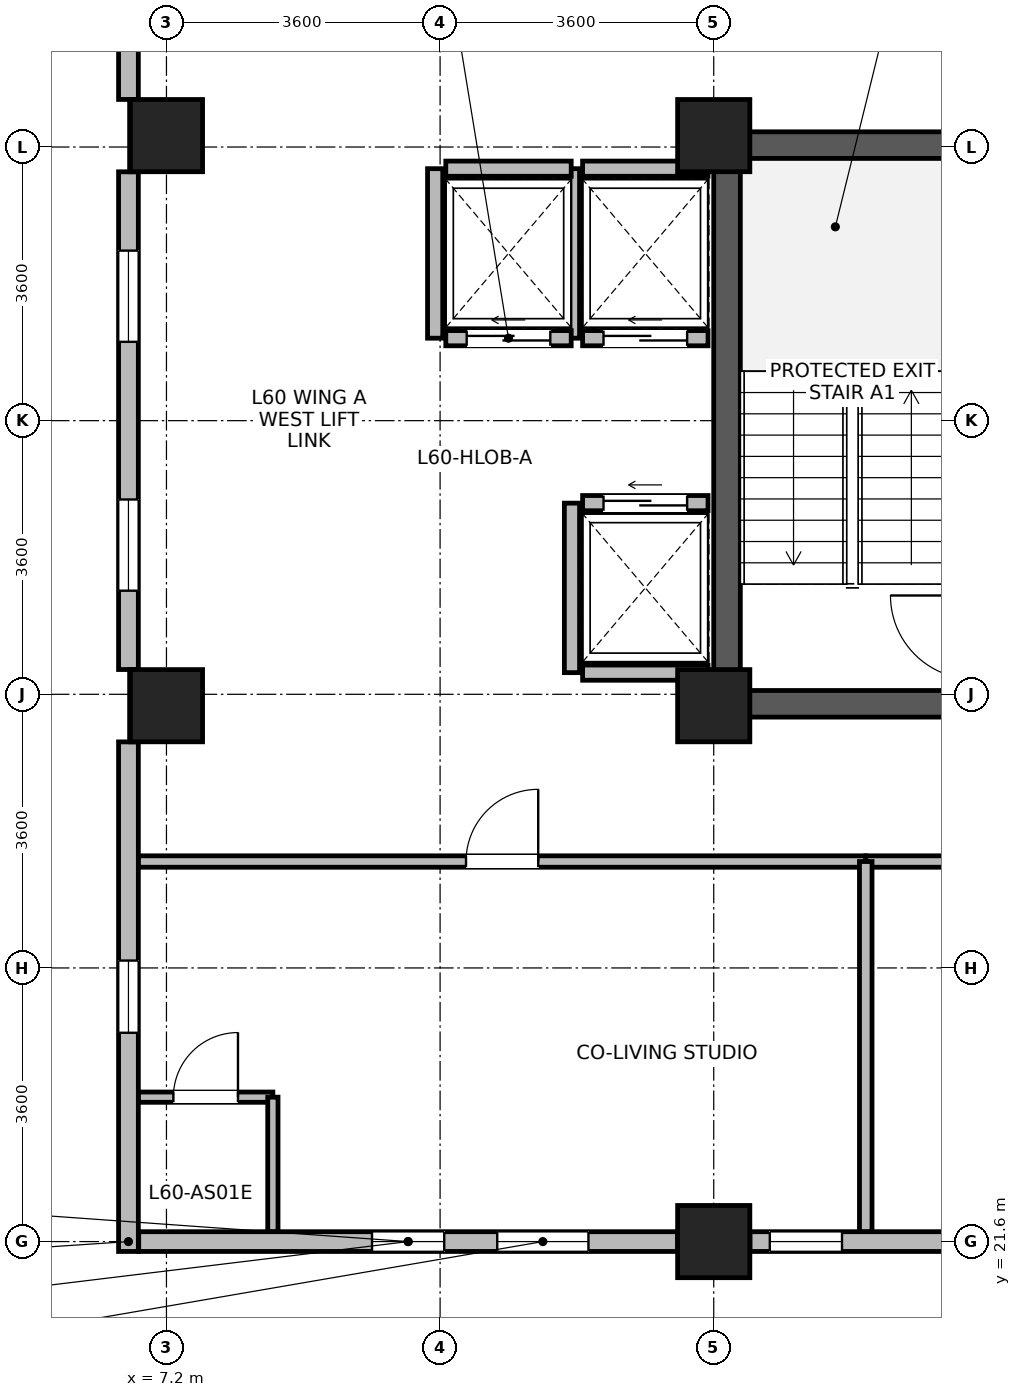
"""IFC4 building model, lengths in metres.
Left out: names, types, materials, properties, quantities, classifications, styles, units other than length and angle.
Written with IfcOpenShell. Run it as: python <this file> out.ifc"""

import sys

from ifc_helpers import new_model, si_unit, direction, frame, frame_2d, origin, origin_2d, place, context, subcontext, project, spatial, rectangle, extrude, source, transform, mapped, element, fill, save


model = new_model("IFC4")
c1 = context("Model", 3, precision=1e-05, world=origin(), true_north=direction((0.0, 1.0)))
c2 = subcontext(c1, "Body", "Model", "MODEL_VIEW")
j1 = project(units=[si_unit("LENGTHUNIT", "METRE"), si_unit("PLANEANGLEUNIT", "RADIAN")], contexts=[c1])
p1 = place(None, origin())
s1 = spatial("IfcSite", under=j1, at=p1, CompositionType="ELEMENT")
p2 = place(p1, origin())
s2 = spatial("IfcBuilding", under=s1, at=p2, CompositionType="ELEMENT")
p3 = place(p2, frame((0.0, 0.0, 235.1)))
s3 = spatial("IfcBuildingStorey", under=s2, at=p3, CompositionType="ELEMENT", Elevation=235.1)
p4 = place(p3, frame((14.575, 28.5, 0.0), z_axis=(0.0, 0.0, 1.0), x_axis=(0.0, 1.0, 0.0)))
e1 = element("IfcWall", 1, at=p4, inside=s3, PredefinedType="SHEAR", context=c2, shape_type="SweptSolid", body=[
    extrude(rectangle(XDim=7.7, YDim=0.35, at=frame_2d((3.85, 0.0))), origin(), (0.0, 0.0, 1.0), 3.44),
])
for number, where, z_axis, x_axis in (
    (2, (14.75, 28.675, 0.0), (0.0, 0.0, 1.0), (1.0, 0.0, 0.0)),
    (3, (14.75, 36.025, 0.0), (0.0, 0.0, 1.0), (1.0, 0.0, 0.0)),
):
    element("IfcWall", number, at=place(p3, frame(where, z_axis=z_axis, x_axis=x_axis)), inside=s3, PredefinedType="SHEAR", context=c2, shape_type="SweptSolid", body=[
        extrude(rectangle(XDim=3.2, YDim=0.35, at=frame_2d((1.6, 0.0))), origin(), (0.0, 0.0, 1.0), 3.44),
    ])
m1 = source(origin(), c2, "Body", "SweptSolid", [
    extrude(rectangle(XDim=0.95, YDim=0.95, at=origin_2d()), origin(), (0.0, 0.0, 1.0), 3.7),
])
for number, where, z_axis, x_axis in (
    (4, (7.2, 28.65, 0.0), (0.0, 0.0, 1.0), (1.0, 0.0, 0.0)),
    (5, (7.2, 36.15, 0.0), (0.0, 0.0, 1.0), (1.0, 0.0, 0.0)),
    (6, (14.4, 21.6, 0.0), (0.0, 0.0, 1.0), (1.0, 0.0, 0.0)),
    (7, (14.4, 28.65, 0.0), (0.0, 0.0, 1.0), (1.0, 0.0, 0.0)),
    (8, (14.4, 36.15, 0.0), (0.0, 0.0, 1.0), (1.0, 0.0, 0.0)),
):
    element("IfcColumn", number, at=place(p3, frame(where, z_axis=z_axis, x_axis=x_axis)), inside=s3, PredefinedType="COLUMN", context=c2, shape_type="MappedRepresentation", body=[
        mapped(m1, transform((0.0, 0.0, 0.0), x_axis=(1.0, 0.0, 0.0), y_axis=(0.0, 1.0, 0.0), z_axis=(0.0, 0.0, 1.0), scale=1.0)),
    ])
p5 = place(p3, frame((13.924, 21.6, 0.0), z_axis=(0.0, 0.0, 1.0), x_axis=(-1.0, 0.0, 0.0)))
e9 = element("IfcWall", 9, at=p5, inside=s3, PredefinedType="STANDARD", context=c2, shape_type="SweptSolid", body=[
    extrude(rectangle(XDim=7.089, YDim=0.26, at=frame_2d((3.544, 0.0))), origin(), (0.0, 0.0, 1.0), 3.42),
])
p6 = place(p5, frame((1.172, 0.0, 0.85)))
e10 = element("IfcOpeningElement", 10, at=p6, cuts=e9, PredefinedType="OPENING", context=c2, shape_type="SweptSolid", body=[
    extrude(rectangle(XDim=1.2, YDim=1.75, at=frame_2d((0.6, 0.875))), frame((0.0, 0.14, 0.0), z_axis=(0.0, -1.0, 0.0), x_axis=(1.0, 0.0, 0.0)), (0.0, 0.0, 1.0), 0.28),
])
p7 = place(p5, frame((3.07, 0.0, 0.85)))
e11 = element("IfcOpeningElement", 11, at=p7, cuts=e9, PredefinedType="OPENING", context=c2, shape_type="SweptSolid", body=[
    extrude(rectangle(XDim=0.95, YDim=1.75, at=frame_2d((0.475, 0.875))), frame((0.0, 0.14, 0.0), z_axis=(0.0, -1.0, 0.0), x_axis=(1.0, 0.0, 0.0)), (0.0, 0.0, 1.0), 0.28),
])
p8 = place(p3, frame((17.8, 21.6, 0.0), z_axis=(0.0, 0.0, 1.0), x_axis=(-1.0, 0.0, 0.0)))
e12 = element("IfcWall", 12, at=p8, inside=s3, PredefinedType="STANDARD", context=c2, shape_type="SweptSolid", body=[
    extrude(rectangle(XDim=2.924, YDim=0.26, at=frame_2d((1.462, 0.0))), origin(), (0.0, 0.0, 1.0), 3.02),
])
p9 = place(p8, frame((1.712, 0.0, 0.85)))
e13 = element("IfcOpeningElement", 13, at=p9, cuts=e12, PredefinedType="OPENING", context=c2, shape_type="SweptSolid", body=[
    extrude(rectangle(XDim=0.95, YDim=1.75, at=frame_2d((0.475, 0.875))), frame((0.0, 0.14, 0.0), z_axis=(0.0, -1.0, 0.0), x_axis=(1.0, 0.0, 0.0)), (0.0, 0.0, 1.0), 0.28),
])
p10 = place(p3, frame((6.7, 36.626, 0.0), z_axis=(0.0, 0.0, 1.0), x_axis=(0.0, 1.0, 0.0)))
e14 = element("IfcWall", 14, at=p10, inside=s3, PredefinedType="STANDARD", context=c2, shape_type="SweptSolid", body=[
    extrude(rectangle(XDim=6.704, YDim=0.26, at=frame_2d((3.352, 0.0))), origin(), (0.0, 0.0, 1.0), 3.42),
])
p11 = place(p10, frame((4.428, 0.0, 0.85)))
e15 = element("IfcOpeningElement", 15, at=p11, cuts=e14, PredefinedType="OPENING", context=c2, shape_type="SweptSolid", body=[
    extrude(rectangle(XDim=1.2, YDim=1.75, at=frame_2d((0.6, 0.875))), frame((0.0, 0.14, 0.0), z_axis=(0.0, -1.0, 0.0), x_axis=(1.0, 0.0, 0.0)), (0.0, 0.0, 1.0), 0.28),
])
p12 = place(p10, frame((2.877, 0.0, 0.85)))
e16 = element("IfcOpeningElement", 16, at=p12, cuts=e14, PredefinedType="OPENING", context=c2, shape_type="SweptSolid", body=[
    extrude(rectangle(XDim=0.95, YDim=1.75, at=frame_2d((0.475, 0.875))), frame((0.0, 0.14, 0.0), z_axis=(0.0, -1.0, 0.0), x_axis=(1.0, 0.0, 0.0)), (0.0, 0.0, 1.0), 0.28),
])
p13 = place(p3, frame((6.7, 29.126, 0.0), z_axis=(0.0, 0.0, 1.0), x_axis=(0.0, 1.0, 0.0)))
e17 = element("IfcWall", 17, at=p13, inside=s3, PredefinedType="STANDARD", context=c2, shape_type="SweptSolid", body=[
    extrude(rectangle(XDim=6.548, YDim=0.26, at=frame_2d((3.274, 0.0))), origin(), (0.0, 0.0, 1.0), 3.42),
])
p14 = place(p13, frame((1.037, 0.0, 0.85)))
e18 = element("IfcOpeningElement", 18, at=p14, cuts=e17, PredefinedType="OPENING", context=c2, shape_type="SweptSolid", body=[
    extrude(rectangle(XDim=1.2, YDim=1.75, at=frame_2d((0.6, 0.875))), frame((0.0, 0.14, 0.0), z_axis=(0.0, -1.0, 0.0), x_axis=(1.0, 0.0, 0.0)), (0.0, 0.0, 1.0), 0.28),
])
p15 = place(p13, frame((4.311, 0.0, 0.85)))
e19 = element("IfcOpeningElement", 19, at=p15, cuts=e17, PredefinedType="OPENING", context=c2, shape_type="SweptSolid", body=[
    extrude(rectangle(XDim=1.2, YDim=1.75, at=frame_2d((0.6, 0.875))), frame((0.0, 0.14, 0.0), z_axis=(0.0, -1.0, 0.0), x_axis=(1.0, 0.0, 0.0)), (0.0, 0.0, 1.0), 0.28),
])
p16 = place(p3, frame((6.7, 21.47, 0.0), z_axis=(0.0, 0.0, 1.0), x_axis=(0.0, 1.0, 0.0)))
e20 = element("IfcWall", 20, at=p16, inside=s3, PredefinedType="STANDARD", context=c2, shape_type="SweptSolid", body=[
    extrude(rectangle(XDim=6.704, YDim=0.26, at=frame_2d((3.352, 0.0))), origin(), (0.0, 0.0, 1.0), 3.42),
])
p17 = place(p16, frame((2.877, 0.0, 0.85)))
e21 = element("IfcOpeningElement", 21, at=p17, cuts=e20, PredefinedType="OPENING", context=c2, shape_type="SweptSolid", body=[
    extrude(rectangle(XDim=0.95, YDim=1.75, at=frame_2d((0.475, 0.875))), frame((0.0, 0.14, 0.0), z_axis=(0.0, -1.0, 0.0), x_axis=(1.0, 0.0, 0.0)), (0.0, 0.0, 1.0), 0.28),
])
p18 = place(p3, frame((12.675, 33.485, 0.0), z_axis=(0.0, 0.0, 1.0), x_axis=(1.0, 0.0, 0.0)))
e22 = element("IfcWall", 22, at=p18, inside=s3, PredefinedType="PARTITIONING", context=c2, shape_type="SweptSolid", body=[
    extrude(rectangle(XDim=1.65, YDim=0.2, at=frame_2d((0.825, 0.0))), origin(), (0.0, 0.0, 1.0), 3.42),
])
p19 = place(p18, frame((0.275, 0.0, 0.0)))
e23 = element("IfcOpeningElement", 23, at=p19, cuts=e22, PredefinedType="OPENING", context=c2, shape_type="SweptSolid", body=[
    extrude(rectangle(XDim=1.1, YDim=2.12, at=frame_2d((0.55, 1.06))), frame((0.0, 0.11, 0.0), z_axis=(0.0, -1.0, 0.0), x_axis=(1.0, 0.0, 0.0)), (0.0, 0.0, 1.0), 0.22),
])
p20 = place(p3, frame((12.675, 35.715, 0.0), z_axis=(0.0, 0.0, 1.0), x_axis=(1.0, 0.0, 0.0)))
e24 = element("IfcWall", 24, at=p20, inside=s3, PredefinedType="PARTITIONING", context=c2, shape_type="SweptSolid", body=[
    extrude(rectangle(XDim=1.65, YDim=0.2, at=frame_2d((0.825, 0.0))), origin(), (0.0, 0.0, 1.0), 3.42),
])
p21 = place(p3, frame((12.535, 33.485, 0.0), z_axis=(0.0, 0.0, 1.0), x_axis=(0.0, 1.0, 0.0)))
e25 = element("IfcWall", 25, at=p21, inside=s3, PredefinedType="PARTITIONING", context=c2, shape_type="SweptSolid", body=[
    extrude(rectangle(XDim=2.23, YDim=0.2, at=frame_2d((1.115, 0.0))), origin(), (0.0, 0.0, 1.0), 3.42),
])
p22 = place(p3, frame((12.675, 29.085, 0.0), z_axis=(0.0, 0.0, 1.0), x_axis=(1.0, 0.0, 0.0)))
e26 = element("IfcWall", 26, at=p22, inside=s3, PredefinedType="PARTITIONING", context=c2, shape_type="SweptSolid", body=[
    extrude(rectangle(XDim=1.65, YDim=0.2, at=frame_2d((0.825, 0.0))), origin(), (0.0, 0.0, 1.0), 3.42),
])
p23 = place(p3, frame((12.675, 31.315, 0.0), z_axis=(0.0, 0.0, 1.0), x_axis=(1.0, 0.0, 0.0)))
e27 = element("IfcWall", 27, at=p23, inside=s3, PredefinedType="PARTITIONING", context=c2, shape_type="SweptSolid", body=[
    extrude(rectangle(XDim=1.65, YDim=0.2, at=frame_2d((0.825, 0.0))), origin(), (0.0, 0.0, 1.0), 3.42),
])
p24 = place(p23, frame((0.275, 0.0, 0.0)))
e28 = element("IfcOpeningElement", 28, at=p24, cuts=e27, PredefinedType="OPENING", context=c2, shape_type="SweptSolid", body=[
    extrude(rectangle(XDim=1.1, YDim=2.12, at=frame_2d((0.55, 1.06))), frame((0.0, 0.11, 0.0), z_axis=(0.0, -1.0, 0.0), x_axis=(1.0, 0.0, 0.0)), (0.0, 0.0, 1.0), 0.22),
])
p25 = place(p3, frame((12.535, 29.085, 0.0), z_axis=(0.0, 0.0, 1.0), x_axis=(0.0, 1.0, 0.0)))
e29 = element("IfcWall", 29, at=p25, inside=s3, PredefinedType="PARTITIONING", context=c2, shape_type="SweptSolid", body=[
    extrude(rectangle(XDim=2.23, YDim=0.2, at=frame_2d((1.115, 0.0))), origin(), (0.0, 0.0, 1.0), 3.42),
])
p26 = place(p3, frame((10.875, 33.485, 0.0), z_axis=(0.0, 0.0, 1.0), x_axis=(1.0, 0.0, 0.0)))
e30 = element("IfcWall", 30, at=p26, inside=s3, PredefinedType="PARTITIONING", context=c2, shape_type="SweptSolid", body=[
    extrude(rectangle(XDim=1.65, YDim=0.2, at=frame_2d((0.825, 0.0))), origin(), (0.0, 0.0, 1.0), 3.42),
])
p27 = place(p26, frame((0.275, 0.0, 0.0)))
e31 = element("IfcOpeningElement", 31, at=p27, cuts=e30, PredefinedType="OPENING", context=c2, shape_type="SweptSolid", body=[
    extrude(rectangle(XDim=1.1, YDim=2.12, at=frame_2d((0.55, 1.06))), frame((0.0, 0.11, 0.0), z_axis=(0.0, -1.0, 0.0), x_axis=(1.0, 0.0, 0.0)), (0.0, 0.0, 1.0), 0.22),
])
p28 = place(p3, frame((10.875, 35.715, 0.0), z_axis=(0.0, 0.0, 1.0), x_axis=(1.0, 0.0, 0.0)))
e32 = element("IfcWall", 32, at=p28, inside=s3, PredefinedType="PARTITIONING", context=c2, shape_type="SweptSolid", body=[
    extrude(rectangle(XDim=1.65, YDim=0.2, at=frame_2d((0.825, 0.0))), origin(), (0.0, 0.0, 1.0), 3.42),
])
p29 = place(p3, frame((10.735, 33.485, 0.0), z_axis=(0.0, 0.0, 1.0), x_axis=(0.0, 1.0, 0.0)))
e33 = element("IfcWall", 33, at=p29, inside=s3, PredefinedType="PARTITIONING", context=c2, shape_type="SweptSolid", body=[
    extrude(rectangle(XDim=2.23, YDim=0.2, at=frame_2d((1.115, 0.0))), origin(), (0.0, 0.0, 1.0), 3.42),
])
p30 = place(p3, frame((6.832, 23.5, 0.0), z_axis=(0.0, 0.0, 1.0), x_axis=(1.0, 0.0, 0.0)))
e34 = element("IfcWall", 34, at=p30, inside=s3, PredefinedType="PARTITIONING", context=c2, shape_type="SweptSolid", body=[
    extrude(rectangle(XDim=1.768, YDim=0.135, at=frame_2d((0.884, 0.0))), origin(), (0.0, 0.0, 1.0), 3.42),
])
p31 = place(p30, frame((0.459, 0.0, 0.0)))
e35 = element("IfcOpeningElement", 35, at=p31, cuts=e34, PredefinedType="OPENING", context=c2, shape_type="SweptSolid", body=[
    extrude(rectangle(XDim=0.85, YDim=2.04, at=frame_2d((0.425, 1.02))), frame((0.0, 0.078, 0.0), z_axis=(0.0, -1.0, 0.0), x_axis=(1.0, 0.0, 0.0)), (0.0, 0.0, 1.0), 0.155),
])
p32 = place(p3, frame((8.6, 21.732, 0.0), z_axis=(0.0, 0.0, 1.0), x_axis=(0.0, 1.0, 0.0)))
e36 = element("IfcWall", 36, at=p32, inside=s3, PredefinedType="PARTITIONING", context=c2, shape_type="SweptSolid", body=[
    extrude(rectangle(XDim=1.768, YDim=0.135, at=frame_2d((0.884, 0.0))), origin(), (0.0, 0.0, 1.0), 3.42),
])
p33 = place(p3, frame((16.4, 26.6, 0.0), z_axis=(0.0, 0.0, 1.0), x_axis=(1.0, 0.0, 0.0)))
e37 = element("IfcWall", 37, at=p33, inside=s3, PredefinedType="PARTITIONING", context=c2, shape_type="SweptSolid", body=[
    extrude(rectangle(XDim=14.54, YDim=0.15, at=frame_2d((7.27, 0.0))), origin(), (0.0, 0.0, 1.0), 3.42),
])
p34 = place(p33, frame((6.62, 0.0, 0.0)))
e38 = element("IfcOpeningElement", 38, at=p34, cuts=e37, PredefinedType="OPENING", context=c2, shape_type="SweptSolid", body=[
    extrude(rectangle(XDim=1.3, YDim=2.12, at=frame_2d((0.65, 1.06))), frame((0.0, 0.085, 0.0), z_axis=(0.0, -1.0, 0.0), x_axis=(1.0, 0.0, 0.0)), (0.0, 0.0, 1.0), 0.17),
])
p35 = place(p3, frame((6.832, 26.6, 0.0), z_axis=(0.0, 0.0, 1.0), x_axis=(1.0, 0.0, 0.0)))
e39 = element("IfcWall", 39, at=p35, inside=s3, PredefinedType="PARTITIONING", context=c2, shape_type="SweptSolid", body=[
    extrude(rectangle(XDim=9.568, YDim=0.15, at=frame_2d((4.784, 0.0))), origin(), (0.0, 0.0, 1.0), 3.42),
])
p36 = place(p35, frame((4.309, 0.0, 0.0)))
e40 = element("IfcOpeningElement", 40, at=p36, cuts=e39, PredefinedType="OPENING", context=c2, shape_type="SweptSolid", body=[
    extrude(rectangle(XDim=0.95, YDim=2.1, at=frame_2d((0.475, 1.05))), frame((0.0, 0.085, 0.0), z_axis=(0.0, -1.0, 0.0), x_axis=(1.0, 0.0, 0.0)), (0.0, 0.0, 1.0), 0.17),
])
p37 = place(p3, frame((16.4, 21.732, 0.0), z_axis=(0.0, 0.0, 1.0), x_axis=(0.0, 1.0, 0.0)))
e41 = element("IfcWall", 41, at=p37, inside=s3, PredefinedType="PARTITIONING", context=c2, shape_type="SweptSolid", body=[
    extrude(rectangle(XDim=4.868, YDim=0.165, at=frame_2d((2.434, 0.0))), origin(), (0.0, 0.0, 1.0), 3.42),
])
p38 = place(p6, origin())
e42 = element("IfcWindow", 42, at=p38, inside=s3, PartitioningType="SINGLE_PANEL", PredefinedType="WINDOW", context=c2, shape_type="SweptSolid", body=[
    extrude(rectangle(XDim=1.2, YDim=1.75, at=frame_2d((0.6, 0.875))), frame((0.0, 0.03, 0.0), z_axis=(0.0, -1.0, 0.0), x_axis=(1.0, 0.0, 0.0)), (0.0, 0.0, 1.0), 0.06),
])
fill(e10, e42)
p39 = place(p7, origin())
e43 = element("IfcWindow", 43, at=p39, inside=s3, PartitioningType="SINGLE_PANEL", PredefinedType="WINDOW", context=c2, shape_type="SweptSolid", body=[
    extrude(rectangle(XDim=0.95, YDim=1.75, at=frame_2d((0.475, 0.875))), frame((0.0, 0.03, 0.0), z_axis=(0.0, -1.0, 0.0), x_axis=(1.0, 0.0, 0.0)), (0.0, 0.0, 1.0), 0.06),
])
fill(e11, e43)
p40 = place(p9, origin())
e44 = element("IfcWindow", 44, at=p40, inside=s3, PartitioningType="SINGLE_PANEL", PredefinedType="WINDOW", context=c2, shape_type="SweptSolid", body=[
    extrude(rectangle(XDim=0.95, YDim=1.75, at=frame_2d((0.475, 0.875))), frame((0.0, 0.03, 0.0), z_axis=(0.0, -1.0, 0.0), x_axis=(1.0, 0.0, 0.0)), (0.0, 0.0, 1.0), 0.06),
])
fill(e13, e44)
p41 = place(p14, origin())
e45 = element("IfcWindow", 45, at=p41, inside=s3, PartitioningType="SINGLE_PANEL", PredefinedType="WINDOW", context=c2, shape_type="SweptSolid", body=[
    extrude(rectangle(XDim=1.2, YDim=1.75, at=frame_2d((0.6, 0.875))), frame((0.0, 0.03, 0.0), z_axis=(0.0, -1.0, 0.0), x_axis=(1.0, 0.0, 0.0)), (0.0, 0.0, 1.0), 0.06),
])
fill(e18, e45)
p42 = place(p15, origin())
e46 = element("IfcWindow", 46, at=p42, inside=s3, PartitioningType="SINGLE_PANEL", PredefinedType="WINDOW", context=c2, shape_type="SweptSolid", body=[
    extrude(rectangle(XDim=1.2, YDim=1.75, at=frame_2d((0.6, 0.875))), frame((0.0, 0.03, 0.0), z_axis=(0.0, -1.0, 0.0), x_axis=(1.0, 0.0, 0.0)), (0.0, 0.0, 1.0), 0.06),
])
fill(e19, e46)
p43 = place(p17, origin())
e47 = element("IfcWindow", 47, at=p43, inside=s3, PartitioningType="SINGLE_PANEL", PredefinedType="WINDOW", context=c2, shape_type="SweptSolid", body=[
    extrude(rectangle(XDim=0.95, YDim=1.75, at=frame_2d((0.475, 0.875))), frame((0.0, 0.03, 0.0), z_axis=(0.0, -1.0, 0.0), x_axis=(1.0, 0.0, 0.0)), (0.0, 0.0, 1.0), 0.06),
])
fill(e21, e47)
p44 = place(p19, origin())
e48 = element("IfcDoor", 48, at=p44, inside=s3, OperationType="SLIDING_TO_LEFT", PredefinedType="DOOR", context=c2, shape_type="SweptSolid", body=[
    extrude(rectangle(XDim=1.1, YDim=2.12, at=frame_2d((0.55, 1.06))), frame((0.0, 0.025, 0.0), z_axis=(0.0, -1.0, 0.0), x_axis=(1.0, 0.0, 0.0)), (0.0, 0.0, 1.0), 0.05),
])
fill(e23, e48)
p45 = place(p24, origin())
e49 = element("IfcDoor", 49, at=p45, inside=s3, OperationType="SLIDING_TO_LEFT", PredefinedType="DOOR", context=c2, shape_type="SweptSolid", body=[
    extrude(rectangle(XDim=1.1, YDim=2.12, at=frame_2d((0.55, 1.06))), frame((0.0, 0.025, 0.0), z_axis=(0.0, -1.0, 0.0), x_axis=(1.0, 0.0, 0.0)), (0.0, 0.0, 1.0), 0.05),
])
fill(e28, e49)
p46 = place(p27, origin())
e50 = element("IfcDoor", 50, at=p46, inside=s3, OperationType="SLIDING_TO_LEFT", PredefinedType="DOOR", context=c2, shape_type="SweptSolid", body=[
    extrude(rectangle(XDim=1.1, YDim=2.12, at=frame_2d((0.55, 1.06))), frame((0.0, 0.025, 0.0), z_axis=(0.0, -1.0, 0.0), x_axis=(1.0, 0.0, 0.0)), (0.0, 0.0, 1.0), 0.05),
])
fill(e31, e50)
p47 = place(p31, origin())
e51 = element("IfcDoor", 51, at=p47, inside=s3, OperationType="SINGLE_SWING_RIGHT", PredefinedType="DOOR", context=c2, shape_type="SweptSolid", body=[
    extrude(rectangle(XDim=0.85, YDim=2.04, at=frame_2d((0.425, 1.02))), frame((0.0, 0.025, 0.0), z_axis=(0.0, -1.0, 0.0), x_axis=(1.0, 0.0, 0.0)), (0.0, 0.0, 1.0), 0.05),
])
fill(e35, e51)
p48 = place(p36, origin())
e52 = element("IfcDoor", 52, at=p48, inside=s3, OperationType="SINGLE_SWING_RIGHT", PredefinedType="DOOR", context=c2, shape_type="SweptSolid", body=[
    extrude(rectangle(XDim=0.95, YDim=2.1, at=frame_2d((0.475, 1.05))), frame((0.0, 0.025, 0.0), z_axis=(0.0, -1.0, 0.0), x_axis=(1.0, 0.0, 0.0)), (0.0, 0.0, 1.0), 0.05),
])
fill(e40, e52)
save(model, sys.argv[1])
